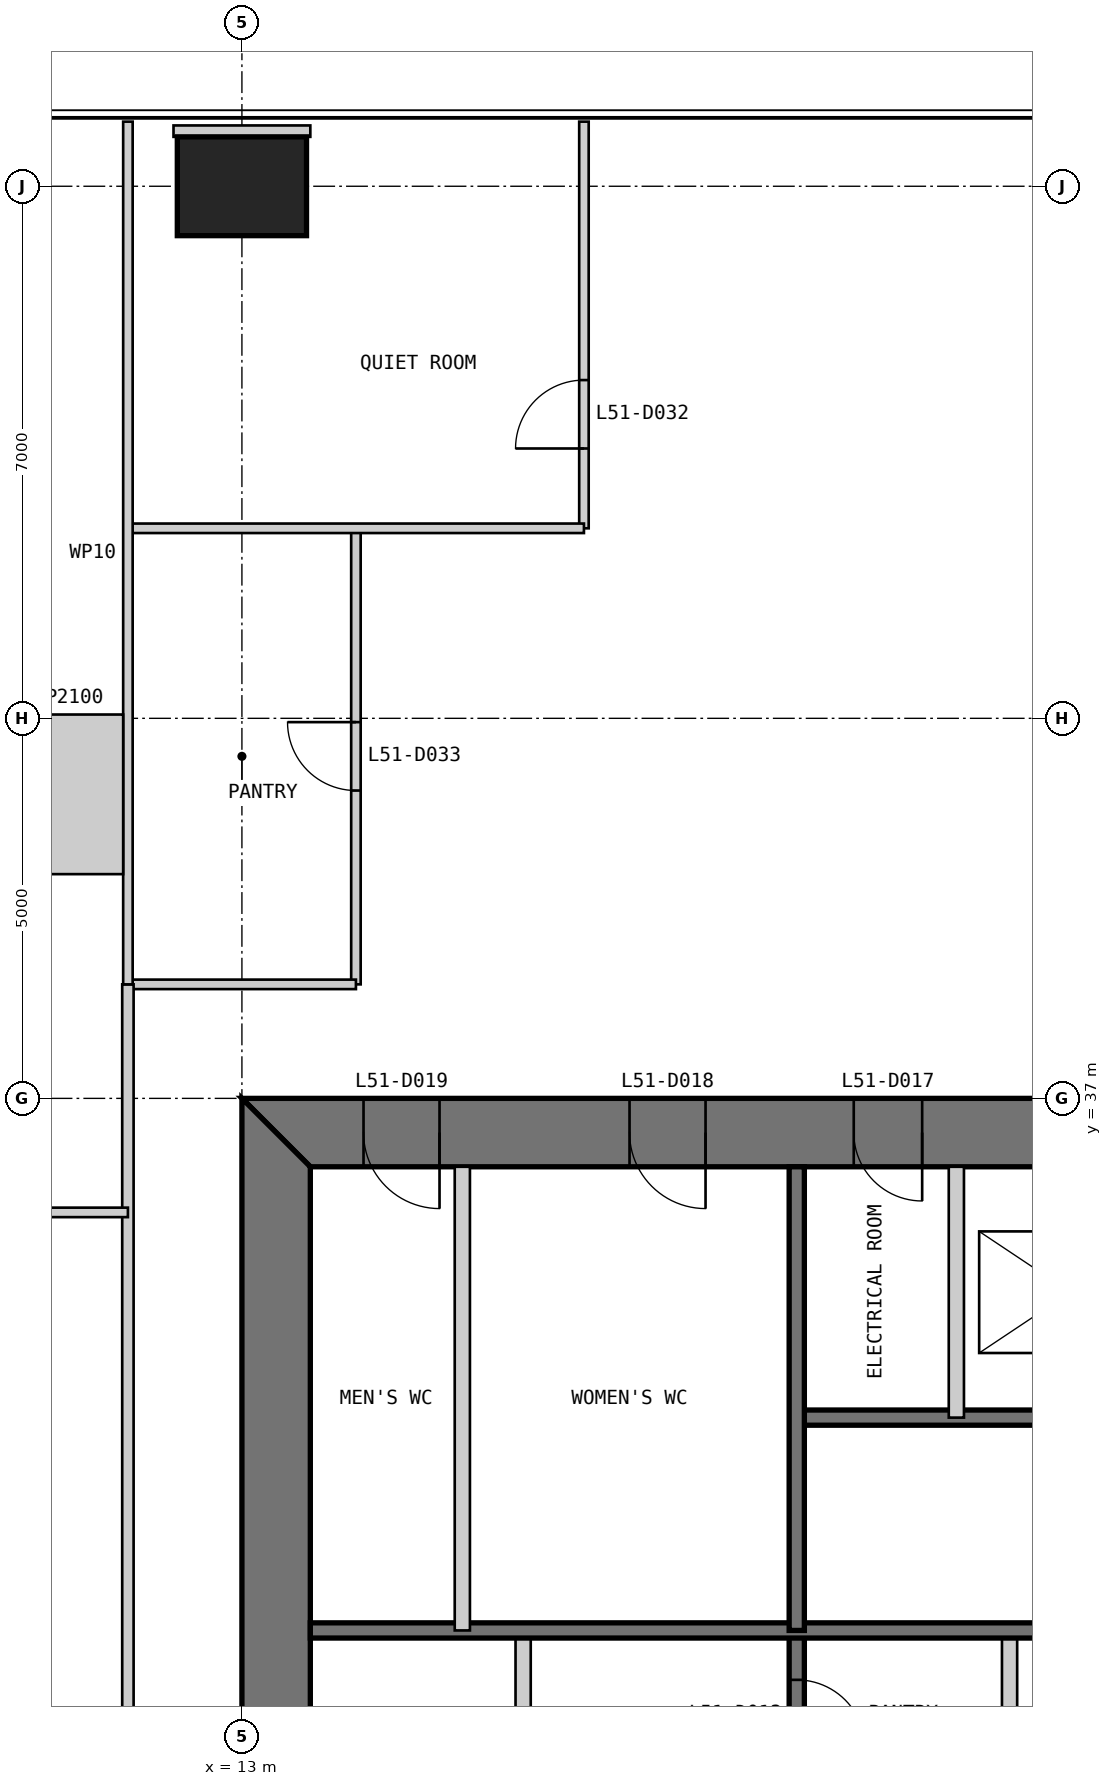
"""IFC4 building model, lengths in metres.
Left out: names, types, materials, properties, quantities, classifications, styles, units other than length and angle.
Written with IfcOpenShell. Run it as: python <this file> out.ifc"""

import sys

from ifc_helpers import new_model, si_unit, direction, frame, frame_2d, origin, origin_2d, place, context, subcontext, project, spatial, polyline, rectangle, outline, extrude, element, fill, save


model = new_model("IFC4")
c1 = context("Model", 3, precision=1e-05, world=origin(), true_north=direction((0.0, 1.0)))
c2 = subcontext(c1, "Body", "Model", "MODEL_VIEW")
j1 = project(units=[si_unit("LENGTHUNIT", "METRE"), si_unit("PLANEANGLEUNIT", "RADIAN")], contexts=[c1])
p1 = place(None, origin())
s1 = spatial("IfcSite", under=j1, at=p1, CompositionType="ELEMENT")
p2 = place(p1, origin())
s2 = spatial("IfcBuilding", under=s1, at=p2, CompositionType="ELEMENT")
p3 = place(p2, frame((0.0, 0.0, 217.8)))
s3 = spatial("IfcBuildingStorey", under=s2, at=p3, CompositionType="ELEMENT", Elevation=217.8)
p4 = place(p3, frame((13.0, 49.0, 0.0), z_axis=(0.0, 0.0, 1.0), x_axis=(1.0, 0.0, 0.0)))
e1 = element("IfcColumn", 1, at=p4, inside=s3, PredefinedType="COLUMN", context=c2, shape_type="SweptSolid", body=[
    extrude(rectangle(XDim=1.7, YDim=1.3, at=origin_2d()), origin(), (0.0, 0.0, 1.0), 4.0),
])
p5 = place(p3, frame((37.0, 36.55, 0.0), z_axis=(0.0, 0.0, 1.0), x_axis=(-1.0, 0.0, 0.0)))
e2 = element("IfcWall", 2, at=p5, inside=s3, PredefinedType="SHEAR", context=c2, shape_type="SweptSolid", body=[
    extrude(outline(polyline([(0.0, -0.45), (24.0, -0.45), (23.1, 0.45), (0.9, 0.45), (0.0, -0.45)])), origin(), (0.0, 0.0, 1.0), 4.0),
])
p6 = place(p5, frame((4.9, 0.0, 0.0)))
e3 = element("IfcOpeningElement", 3, at=p6, cuts=e2, PredefinedType="OPENING", context=c2, shape_type="SweptSolid", body=[
    extrude(rectangle(XDim=1.0, YDim=2.2, at=frame_2d((0.5, 1.1))), frame((0.0, 0.46, 0.0), z_axis=(0.0, -1.0, 0.0), x_axis=(1.0, 0.0, 0.0)), (0.0, 0.0, 1.0), 0.92),
])
p7 = place(p5, frame((8.9, 0.0, 0.0)))
e4 = element("IfcOpeningElement", 4, at=p7, cuts=e2, PredefinedType="OPENING", context=c2, shape_type="SweptSolid", body=[
    extrude(rectangle(XDim=1.1, YDim=2.2, at=frame_2d((0.55, 1.1))), frame((0.0, 0.46, 0.0), z_axis=(0.0, -1.0, 0.0), x_axis=(1.0, 0.0, 0.0)), (0.0, 0.0, 1.0), 0.92),
])
p8 = place(p5, frame((15.05, 0.0, 0.0)))
e5 = element("IfcOpeningElement", 5, at=p8, cuts=e2, PredefinedType="OPENING", context=c2, shape_type="SweptSolid", body=[
    extrude(rectangle(XDim=0.9, YDim=2.2, at=frame_2d((0.45, 1.1))), frame((0.0, 0.46, 0.0), z_axis=(0.0, -1.0, 0.0), x_axis=(1.0, 0.0, 0.0)), (0.0, 0.0, 1.0), 0.92),
])
p9 = place(p5, frame((17.9, 0.0, 0.0)))
e6 = element("IfcOpeningElement", 6, at=p9, cuts=e2, PredefinedType="OPENING", context=c2, shape_type="SweptSolid", body=[
    extrude(rectangle(XDim=1.0, YDim=2.2, at=frame_2d((0.5, 1.1))), frame((0.0, 0.46, 0.0), z_axis=(0.0, -1.0, 0.0), x_axis=(1.0, 0.0, 0.0)), (0.0, 0.0, 1.0), 0.92),
])
p10 = place(p5, frame((21.4, 0.0, 0.0)))
e7 = element("IfcOpeningElement", 7, at=p10, cuts=e2, PredefinedType="OPENING", context=c2, shape_type="SweptSolid", body=[
    extrude(rectangle(XDim=1.0, YDim=2.2, at=frame_2d((0.5, 1.1))), frame((0.0, 0.46, 0.0), z_axis=(0.0, -1.0, 0.0), x_axis=(1.0, 0.0, 0.0)), (0.0, 0.0, 1.0), 0.92),
])
p11 = place(p3, frame((13.45, 36.1, 0.0), z_axis=(0.0, 0.0, 1.0), x_axis=(0.0, -1.0, 0.0)))
e8 = element("IfcWall", 8, at=p11, inside=s3, PredefinedType="SHEAR", context=c2, shape_type="SweptSolid", body=[
    extrude(outline(polyline([(-0.9, -0.45), (23.1, -0.45), (22.2, 0.45), (0.0, 0.45), (-0.9, -0.45)])), origin(), (0.0, 0.0, 1.0), 4.0),
])
p12 = place(p11, frame((20.2, 0.0, 0.0)))
e9 = element("IfcOpeningElement", 9, at=p12, cuts=e8, PredefinedType="OPENING", context=c2, shape_type="SweptSolid", body=[
    extrude(rectangle(XDim=1.0, YDim=2.2, at=frame_2d((0.5, 1.1))), frame((0.0, 0.46, 0.0), z_axis=(0.0, -1.0, 0.0), x_axis=(1.0, 0.0, 0.0)), (0.0, 0.0, 1.0), 0.92),
])
p13 = place(p11, frame((17.25, 0.0, 0.0)))
e10 = element("IfcOpeningElement", 10, at=p13, cuts=e8, PredefinedType="OPENING", context=c2, shape_type="SweptSolid", body=[
    extrude(rectangle(XDim=0.9, YDim=2.2, at=frame_2d((0.45, 1.1))), frame((0.0, 0.46, 0.0), z_axis=(0.0, -1.0, 0.0), x_axis=(1.0, 0.0, 0.0)), (0.0, 0.0, 1.0), 0.92),
])
p14 = place(p3, frame((16.7, 13.9, 0.0), z_axis=(0.0, 0.0, 1.0), x_axis=(0.0, 1.0, 0.0)))
e11 = element("IfcWall", 11, at=p14, inside=s3, PredefinedType="PARTITIONING", context=c2, shape_type="SweptSolid", body=[
    extrude(rectangle(XDim=16.1, YDim=0.2, at=frame_2d((8.05, 0.0))), origin(), (0.0, 0.0, 1.0), 3.8),
])
p15 = place(p14, frame((9.65, 0.0, 0.0)))
e12 = element("IfcOpeningElement", 12, at=p15, cuts=e11, PredefinedType="OPENING", context=c2, shape_type="SweptSolid", body=[
    extrude(rectangle(XDim=0.9, YDim=2.2, at=frame_2d((0.45, 1.1))), frame((0.0, 0.11, 0.0), z_axis=(0.0, -1.0, 0.0), x_axis=(1.0, 0.0, 0.0)), (0.0, 0.0, 1.0), 0.22),
])
p16 = place(p14, frame((13.65, 0.0, 0.0)))
e13 = element("IfcOpeningElement", 13, at=p16, cuts=e11, PredefinedType="OPENING", context=c2, shape_type="SweptSolid", body=[
    extrude(rectangle(XDim=0.9, YDim=2.2, at=frame_2d((0.45, 1.1))), frame((0.0, 0.11, 0.0), z_axis=(0.0, -1.0, 0.0), x_axis=(1.0, 0.0, 0.0)), (0.0, 0.0, 1.0), 0.22),
])
p17 = place(p3, frame((20.3, 13.9, 0.0), z_axis=(0.0, 0.0, 1.0), x_axis=(0.0, 1.0, 0.0)))
e14 = element("IfcWall", 14, at=p17, inside=s3, PredefinedType="SOLIDWALL", context=c2, shape_type="SweptSolid", body=[
    extrude(rectangle(XDim=16.1, YDim=0.2, at=frame_2d((8.05, 0.0))), origin(), (0.0, 0.0, 1.0), 3.8),
])
p18 = place(p17, frame((7.85, 0.0, 0.0)))
e15 = element("IfcOpeningElement", 15, at=p18, cuts=e14, PredefinedType="OPENING", context=c2, shape_type="SweptSolid", body=[
    extrude(rectangle(XDim=0.9, YDim=2.2, at=frame_2d((0.45, 1.1))), frame((0.0, 0.11, 0.0), z_axis=(0.0, -1.0, 0.0), x_axis=(1.0, 0.0, 0.0)), (0.0, 0.0, 1.0), 0.22),
])
p19 = place(p17, frame((11.75, 0.0, 0.0)))
e16 = element("IfcOpeningElement", 16, at=p19, cuts=e14, PredefinedType="OPENING", context=c2, shape_type="SweptSolid", body=[
    extrude(rectangle(XDim=0.9, YDim=2.2, at=frame_2d((0.45, 1.1))), frame((0.0, 0.11, 0.0), z_axis=(0.0, -1.0, 0.0), x_axis=(1.0, 0.0, 0.0)), (0.0, 0.0, 1.0), 0.22),
])
p20 = place(p17, frame((14.55, 0.0, 0.0)))
e17 = element("IfcOpeningElement", 17, at=p20, cuts=e14, PredefinedType="OPENING", context=c2, shape_type="SweptSolid", body=[
    extrude(rectangle(XDim=0.9, YDim=2.2, at=frame_2d((0.45, 1.1))), frame((0.0, 0.11, 0.0), z_axis=(0.0, -1.0, 0.0), x_axis=(1.0, 0.0, 0.0)), (0.0, 0.0, 1.0), 0.22),
])
p21 = place(p3, frame((23.1, 20.0, 0.0), z_axis=(0.0, 0.0, 1.0), x_axis=(0.0, 1.0, 0.0)))
e18 = element("IfcWall", 18, at=p21, inside=s3, PredefinedType="PARTITIONING", context=c2, shape_type="SweptSolid", body=[
    extrude(rectangle(XDim=10.0, YDim=0.2, at=frame_2d((5.0, 0.0))), origin(), (0.0, 0.0, 1.0), 3.8),
])
p22 = place(p3, frame((29.7, 32.8, 0.0), z_axis=(0.0, 0.0, 1.0), x_axis=(-1.0, 0.0, 0.0)))
e19 = element("IfcWall", 19, at=p22, inside=s3, PredefinedType="SOLIDWALL", context=c2, shape_type="SweptSolid", body=[
    extrude(rectangle(XDim=9.4, YDim=0.2, at=frame_2d((4.7, 0.0))), origin(), (0.0, 0.0, 1.0), 3.8),
])
p23 = place(p22, frame((0.25, 0.0, 0.0)))
e20 = element("IfcOpeningElement", 20, at=p23, cuts=e19, PredefinedType="OPENING", context=c2, shape_type="SweptSolid", body=[
    extrude(rectangle(XDim=1.0, YDim=2.2, at=frame_2d((0.5, 1.1))), frame((0.0, 0.11, 0.0), z_axis=(0.0, -1.0, 0.0), x_axis=(1.0, 0.0, 0.0)), (0.0, 0.0, 1.0), 0.22),
])
p24 = place(p3, frame((29.7, 30.0, 0.0), z_axis=(0.0, 0.0, 1.0), x_axis=(-1.0, 0.0, 0.0)))
e21 = element("IfcWall", 21, at=p24, inside=s3, PredefinedType="SOLIDWALL", context=c2, shape_type="SweptSolid", body=[
    extrude(rectangle(XDim=15.8, YDim=0.2, at=frame_2d((7.9, 0.0))), origin(), (0.0, 0.0, 1.0), 3.8),
])
p25 = place(p3, frame((22.4, 36.1, 0.0), z_axis=(0.0, 0.0, 1.0), x_axis=(0.0, -1.0, 0.0)))
e22 = element("IfcWall", 22, at=p25, inside=s3, PredefinedType="PARTITIONING", context=c2, shape_type="SweptSolid", body=[
    extrude(rectangle(XDim=3.3, YDim=0.2, at=frame_2d((1.65, 0.0))), origin(), (0.0, 0.0, 1.0), 3.8),
])
p26 = place(p3, frame((20.3, 36.1, 0.0), z_axis=(0.0, 0.0, 1.0), x_axis=(0.0, -1.0, 0.0)))
e23 = element("IfcWall", 23, at=p26, inside=s3, PredefinedType="SOLIDWALL", context=c2, shape_type="SweptSolid", body=[
    extrude(rectangle(XDim=6.1, YDim=0.2, at=frame_2d((3.05, 0.0))), origin(), (0.0, 0.0, 1.0), 3.8),
])
p27 = place(p3, frame((15.9, 36.1, 0.0), z_axis=(0.0, 0.0, 1.0), x_axis=(0.0, -1.0, 0.0)))
e24 = element("IfcWall", 24, at=p27, inside=s3, PredefinedType="PARTITIONING", context=c2, shape_type="SweptSolid", body=[
    extrude(rectangle(XDim=6.1, YDim=0.2, at=frame_2d((3.05, 0.0))), origin(), (0.0, 0.0, 1.0), 3.8),
])
p28 = place(p3, frame((17.5, 49.85, 0.0), z_axis=(0.0, 0.0, 1.0), x_axis=(0.0, -1.0, 0.0)))
e25 = element("IfcWall", 25, at=p28, inside=s3, PredefinedType="PARTITIONING", context=c2, shape_type="SweptSolid", body=[
    extrude(rectangle(XDim=5.35, YDim=0.125, at=frame_2d((2.675, 0.0))), origin(), (0.0, 0.0, 1.0), 3.85),
])
p29 = place(p28, frame((3.4, 0.0, 0.0)))
e26 = element("IfcOpeningElement", 26, at=p29, cuts=e25, PredefinedType="OPENING", context=c2, shape_type="SweptSolid", body=[
    extrude(rectangle(XDim=0.9, YDim=2.2, at=frame_2d((0.45, 1.1))), frame((0.0, 0.073, 0.0), z_axis=(0.0, -1.0, 0.0), x_axis=(1.0, 0.0, 0.0)), (0.0, 0.0, 1.0), 0.145),
])
p30 = place(p3, frame((14.5, 44.5, 0.0), z_axis=(0.0, 0.0, 1.0), x_axis=(0.0, -1.0, 0.0)))
e27 = element("IfcWall", 27, at=p30, inside=s3, PredefinedType="PARTITIONING", context=c2, shape_type="SweptSolid", body=[
    extrude(rectangle(XDim=6.0, YDim=0.125, at=frame_2d((3.0, 0.0))), origin(), (0.0, 0.0, 1.0), 3.85),
])
p31 = place(p30, frame((2.55, 0.0, 0.0)))
e28 = element("IfcOpeningElement", 28, at=p31, cuts=e27, PredefinedType="OPENING", context=c2, shape_type="SweptSolid", body=[
    extrude(rectangle(XDim=0.9, YDim=2.2, at=frame_2d((0.45, 1.1))), frame((0.0, 0.073, 0.0), z_axis=(0.0, -1.0, 0.0), x_axis=(1.0, 0.0, 0.0)), (0.0, 0.0, 1.0), 0.145),
])
p32 = place(p3, frame((17.5, 44.5, 0.0), z_axis=(0.0, 0.0, 1.0), x_axis=(-1.0, 0.0, 0.0)))
e29 = element("IfcWall", 29, at=p32, inside=s3, PredefinedType="PARTITIONING", context=c2, shape_type="SweptSolid", body=[
    extrude(rectangle(XDim=6.0, YDim=0.125, at=frame_2d((3.0, 0.0))), origin(), (0.0, 0.0, 1.0), 3.85),
])
p33 = place(p3, frame((14.5, 38.5, 0.0), z_axis=(0.0, 0.0, 1.0), x_axis=(-1.0, 0.0, 0.0)))
e30 = element("IfcWall", 30, at=p33, inside=s3, PredefinedType="PARTITIONING", context=c2, shape_type="SweptSolid", body=[
    extrude(rectangle(XDim=3.0, YDim=0.125, at=frame_2d((1.5, 0.0))), origin(), (0.0, 0.0, 1.0), 3.85),
])
p34 = place(p3, frame((11.5, 38.5, 0.0), z_axis=(0.0, 0.0, 1.0), x_axis=(0.0, -1.0, 0.0)))
e31 = element("IfcWall", 31, at=p34, inside=s3, PredefinedType="PARTITIONING", context=c2, shape_type="SweptSolid", body=[
    extrude(rectangle(XDim=27.0, YDim=0.15, at=frame_2d((13.5, 0.0))), origin(), (0.0, 0.0, 1.0), 3.85),
])
p35 = place(p34, frame((13.0, 0.0, 0.0)))
e32 = element("IfcOpeningElement", 32, at=p35, cuts=e31, PredefinedType="OPENING", context=c2, shape_type="SweptSolid", body=[
    extrude(rectangle(XDim=1.0, YDim=2.2, at=frame_2d((0.5, 1.1))), frame((0.0, 0.085, 0.0), z_axis=(0.0, -1.0, 0.0), x_axis=(1.0, 0.0, 0.0)), (0.0, 0.0, 1.0), 0.17),
])
p36 = place(p3, frame((11.5, 49.85, 0.0), z_axis=(0.0, 0.0, 1.0), x_axis=(0.0, -1.0, 0.0)))
e33 = element("IfcWall", 33, at=p36, inside=s3, PredefinedType="PARTITIONING", context=c2, shape_type="SweptSolid", body=[
    extrude(rectangle(XDim=11.35, YDim=0.125, at=frame_2d((5.675, 0.0))), origin(), (0.0, 0.0, 1.0), 3.85),
])
p37 = place(p3, frame((0.15, 35.5, 0.0), z_axis=(0.0, 0.0, 1.0), x_axis=(1.0, 0.0, 0.0)))
e34 = element("IfcWall", 34, at=p37, inside=s3, PredefinedType="PARTITIONING", context=c2, shape_type="SweptSolid", body=[
    extrude(rectangle(XDim=11.35, YDim=0.125, at=frame_2d((5.675, 0.0))), origin(), (0.0, 0.0, 1.0), 3.85),
])
p38 = place(p37, frame((7.9, 0.0, 0.0)))
e35 = element("IfcOpeningElement", 35, at=p38, cuts=e34, PredefinedType="OPENING", context=c2, shape_type="SweptSolid", body=[
    extrude(rectangle(XDim=0.9, YDim=2.2, at=frame_2d((0.45, 1.1))), frame((0.0, 0.073, 0.0), z_axis=(0.0, -1.0, 0.0), x_axis=(1.0, 0.0, 0.0)), (0.0, 0.0, 1.0), 0.145),
])
p39 = place(p3, frame((13.0, 49.8, 0.0), z_axis=(0.0, 0.0, 1.0), x_axis=(0.0, -1.0, 0.0)))
e36 = element("IfcWall", 36, at=p39, inside=s3, PredefinedType="PARTITIONING", context=c2, shape_type="SweptSolid", body=[
    extrude(rectangle(XDim=0.15, YDim=1.8, at=frame_2d((0.075, 0.0))), origin(), (0.0, 0.0, 1.0), 3.85),
])
p40 = place(p3, frame((11.438, 41.0, 0.0), z_axis=(0.0, 0.0, 1.0), x_axis=(-1.0, 0.0, 0.0)))
e37 = element("IfcWall", 37, at=p40, inside=s3, PredefinedType="PARTITIONING", context=c2, shape_type="SweptSolid", body=[
    extrude(rectangle(XDim=1.438, YDim=2.1, at=frame_2d((0.719, 0.0))), origin(), (0.0, 0.0, 1.0), 3.85),
])
p41 = place(p20, frame((0.9, 0.0, 0.0), z_axis=(0.0, 0.0, 1.0), x_axis=(-1.0, 0.0, 0.0)))
e38 = element("IfcDoor", 38, at=p41, inside=s3, OperationType="SINGLE_SWING_RIGHT", PredefinedType="DOOR", context=c2, shape_type="SweptSolid", body=[
    extrude(rectangle(XDim=0.9, YDim=2.2, at=frame_2d((0.45, 1.1))), frame((0.0, 0.025, 0.0), z_axis=(0.0, -1.0, 0.0), x_axis=(1.0, 0.0, 0.0)), (0.0, 0.0, 1.0), 0.05),
])
fill(e17, e38)
p42 = place(p8, origin())
e39 = element("IfcDoor", 39, at=p42, inside=s3, OperationType="SINGLE_SWING_LEFT", PredefinedType="DOOR", context=c2, shape_type="SweptSolid", body=[
    extrude(rectangle(XDim=0.9, YDim=2.2, at=frame_2d((0.45, 1.1))), frame((0.0, 0.025, 0.0), z_axis=(0.0, -1.0, 0.0), x_axis=(1.0, 0.0, 0.0)), (0.0, 0.0, 1.0), 0.05),
    extrude(outline(polyline([(0.0, 0.0), (0.04, 0.0), (0.04, 2.16), (0.86, 2.16), (0.86, 0.0), (0.9, 0.0), (0.9, 2.2), (0.0, 2.2), (0.0, 0.0)])), frame((0.0, 0.3, 0.0), z_axis=(0.0, -1.0, 0.0), x_axis=(1.0, 0.0, 0.0)), (0.0, 0.0, 1.0), 0.6),
])
fill(e5, e39)
p43 = place(p9, origin())
e40 = element("IfcDoor", 40, at=p43, inside=s3, OperationType="SINGLE_SWING_LEFT", PredefinedType="DOOR", context=c2, shape_type="SweptSolid", body=[
    extrude(rectangle(XDim=1.0, YDim=2.2, at=frame_2d((0.5, 1.1))), frame((0.0, 0.025, 0.0), z_axis=(0.0, -1.0, 0.0), x_axis=(1.0, 0.0, 0.0)), (0.0, 0.0, 1.0), 0.05),
    extrude(outline(polyline([(0.0, 0.0), (0.04, 0.0), (0.04, 2.16), (0.96, 2.16), (0.96, 0.0), (1.0, 0.0), (1.0, 2.2), (0.0, 2.2), (0.0, 0.0)])), frame((0.0, 0.3, 0.0), z_axis=(0.0, -1.0, 0.0), x_axis=(1.0, 0.0, 0.0)), (0.0, 0.0, 1.0), 0.6),
])
fill(e6, e40)
p44 = place(p10, origin())
e41 = element("IfcDoor", 41, at=p44, inside=s3, OperationType="SINGLE_SWING_LEFT", PredefinedType="DOOR", context=c2, shape_type="SweptSolid", body=[
    extrude(rectangle(XDim=1.0, YDim=2.2, at=frame_2d((0.5, 1.1))), frame((0.0, 0.025, 0.0), z_axis=(0.0, -1.0, 0.0), x_axis=(1.0, 0.0, 0.0)), (0.0, 0.0, 1.0), 0.05),
    extrude(outline(polyline([(0.0, 0.0), (0.04, 0.0), (0.04, 2.16), (0.96, 2.16), (0.96, 0.0), (1.0, 0.0), (1.0, 2.2), (0.0, 2.2), (0.0, 0.0)])), frame((0.0, 0.3, 0.0), z_axis=(0.0, -1.0, 0.0), x_axis=(1.0, 0.0, 0.0)), (0.0, 0.0, 1.0), 0.6),
])
fill(e7, e41)
p45 = place(p29, frame((0.9, 0.0, 0.0), z_axis=(0.0, 0.0, 1.0), x_axis=(-1.0, 0.0, 0.0)))
e42 = element("IfcDoor", 42, at=p45, inside=s3, OperationType="SINGLE_SWING_LEFT", PredefinedType="DOOR", context=c2, shape_type="SweptSolid", body=[
    extrude(rectangle(XDim=0.9, YDim=2.2, at=frame_2d((0.45, 1.1))), frame((0.0, 0.025, 0.0), z_axis=(0.0, -1.0, 0.0), x_axis=(1.0, 0.0, 0.0)), (0.0, 0.0, 1.0), 0.05),
])
fill(e26, e42)
p46 = place(p31, frame((0.9, 0.0, 0.0), z_axis=(0.0, 0.0, 1.0), x_axis=(-1.0, 0.0, 0.0)))
e43 = element("IfcDoor", 43, at=p46, inside=s3, OperationType="SINGLE_SWING_RIGHT", PredefinedType="DOOR", context=c2, shape_type="SweptSolid", body=[
    extrude(rectangle(XDim=0.9, YDim=2.2, at=frame_2d((0.45, 1.1))), frame((0.0, 0.025, 0.0), z_axis=(0.0, -1.0, 0.0), x_axis=(1.0, 0.0, 0.0)), (0.0, 0.0, 1.0), 0.05),
])
fill(e28, e43)
save(model, sys.argv[1])
